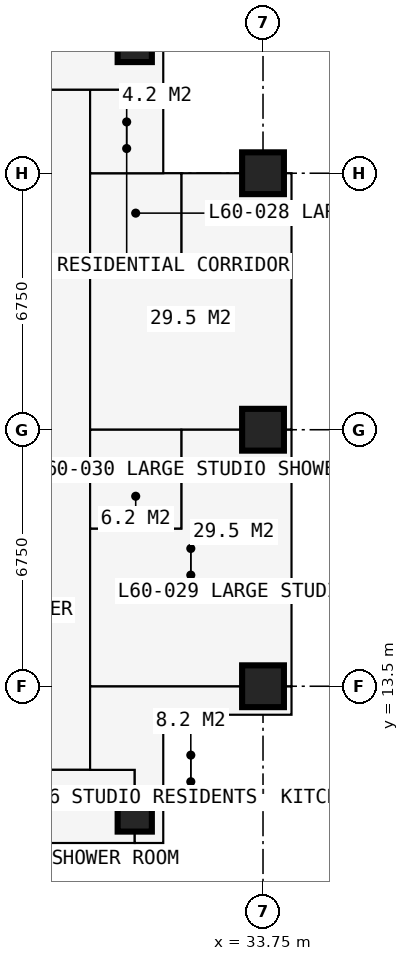
"""IFC4 building model, lengths in metres.
Left out: names, types, materials, properties, quantities, classifications, styles, units other than length and angle.
Written with IfcOpenShell. Run it as: python <this file> out.ifc"""

import sys

from ifc_helpers import new_model, si_unit, direction, frame, frame_2d, origin, origin_2d, place, context, subcontext, project, spatial, rectangle, extrude, element, fill, save


model = new_model("IFC4")
c1 = context("Model", 3, precision=1e-05, world=origin(), true_north=direction((0.0, 1.0)))
c2 = subcontext(c1, "Body", "Model", "MODEL_VIEW")
j1 = project(units=[si_unit("LENGTHUNIT", "METRE"), si_unit("PLANEANGLEUNIT", "RADIAN")], contexts=[c1])
p1 = place(None, origin())
s1 = spatial("IfcSite", under=j1, at=p1, CompositionType="ELEMENT")
p2 = place(p1, origin())
s2 = spatial("IfcBuilding", under=s1, at=p2, CompositionType="ELEMENT")
p3 = place(p2, frame((0.0, 0.0, 222.3)))
s3 = spatial("IfcBuildingStorey", under=s2, at=p3, CompositionType="ELEMENT", Elevation=222.3)
for number, where, z_axis, x_axis in (
    (1, (30.375, 10.125, 0.0), (0.0, 0.0, 1.0), (1.0, 0.0, 0.0)),
    (2, (30.375, 30.375, 0.0), (0.0, 0.0, 1.0), (1.0, 0.0, 0.0)),
):
    element("IfcColumn", number, at=place(p3, frame(where, z_axis=z_axis, x_axis=x_axis)), inside=s3, PredefinedType="COLUMN", context=c2, shape_type="SweptSolid", body=[
        extrude(rectangle(XDim=0.9, YDim=0.9, at=origin_2d()), origin(), (0.0, 0.0, 1.0), 3.6),
    ])
for number, where, z_axis, x_axis in (
    (3, (33.75, 13.5, 0.0), (0.0, 0.0, 1.0), (1.0, 0.0, 0.0)),
    (4, (33.75, 20.25, 0.0), (0.0, 0.0, 1.0), (1.0, 0.0, 0.0)),
    (5, (33.75, 27.0, 0.0), (0.0, 0.0, 1.0), (1.0, 0.0, 0.0)),
):
    element("IfcColumn", number, at=place(p3, frame(where, z_axis=z_axis, x_axis=x_axis)), inside=s3, PredefinedType="COLUMN", context=c2, shape_type="SweptSolid", body=[
        extrude(rectangle(XDim=1.1, YDim=1.1, at=origin_2d()), origin(), (0.0, 0.0, 1.0), 3.6),
    ])
p4 = place(p3, frame((34.5, 27.75, 0.0), z_axis=(0.0, 0.0, 1.0), x_axis=(-1.0, 0.0, 0.0)))
e6 = element("IfcWall", 6, at=p4, inside=s3, PredefinedType="SOLIDWALL", context=c2, shape_type="SweptSolid", body=[
    extrude(rectangle(XDim=3.375, YDim=0.3, at=frame_2d((1.688, 0.0))), origin(), (0.0, 0.0, 1.0), 3.375),
])
p5 = place(p4, frame((0.788, 0.0, 0.6)))
e7 = element("IfcOpeningElement", 7, at=p5, cuts=e6, PredefinedType="OPENING", context=c2, shape_type="SweptSolid", body=[
    extrude(rectangle(XDim=1.8, YDim=2.1, at=frame_2d((0.9, 1.05))), frame((0.0, 0.16, 0.0), z_axis=(0.0, -1.0, 0.0), x_axis=(1.0, 0.0, 0.0)), (0.0, 0.0, 1.0), 0.32),
])
p6 = place(p3, frame((31.125, 27.75, 0.0), z_axis=(0.0, 0.0, 1.0), x_axis=(0.0, 1.0, 0.0)))
e8 = element("IfcWall", 8, at=p6, inside=s3, PredefinedType="SOLIDWALL", context=c2, shape_type="SweptSolid", body=[
    extrude(rectangle(XDim=3.375, YDim=0.3, at=frame_2d((1.688, 0.0))), origin(), (0.0, 0.0, 1.0), 3.375),
])
p7 = place(p6, frame((1.663, 0.0, 0.9)))
e9 = element("IfcOpeningElement", 9, at=p7, cuts=e8, PredefinedType="OPENING", context=c2, shape_type="SweptSolid", body=[
    extrude(rectangle(XDim=1.5, YDim=1.8, at=frame_2d((0.75, 0.9))), frame((0.0, 0.16, 0.0), z_axis=(0.0, -1.0, 0.0), x_axis=(1.0, 0.0, 0.0)), (0.0, 0.0, 1.0), 0.32),
])
p8 = place(p3, frame((27.75, 9.375, 0.0), z_axis=(0.0, 0.0, 1.0), x_axis=(1.0, 0.0, 0.0)))
e10 = element("IfcWall", 10, at=p8, inside=s3, PredefinedType="SOLIDWALL", context=c2, shape_type="SweptSolid", body=[
    extrude(rectangle(XDim=3.375, YDim=0.3, at=frame_2d((1.688, 0.0))), origin(), (0.0, 0.0, 1.0), 3.375),
])
p9 = place(p8, frame((0.788, 0.0, 0.6)))
e11 = element("IfcOpeningElement", 11, at=p9, cuts=e10, PredefinedType="OPENING", context=c2, shape_type="SweptSolid", body=[
    extrude(rectangle(XDim=1.8, YDim=2.1, at=frame_2d((0.9, 1.05))), frame((0.0, 0.16, 0.0), z_axis=(0.0, -1.0, 0.0), x_axis=(1.0, 0.0, 0.0)), (0.0, 0.0, 1.0), 0.32),
])
p10 = place(p3, frame((31.125, 9.375, 0.0), z_axis=(0.0, 0.0, 1.0), x_axis=(0.0, 1.0, 0.0)))
e12 = element("IfcWall", 12, at=p10, inside=s3, PredefinedType="SOLIDWALL", context=c2, shape_type="SweptSolid", body=[
    extrude(rectangle(XDim=3.375, YDim=0.3, at=frame_2d((1.688, 0.0))), origin(), (0.0, 0.0, 1.0), 3.375),
])
p11 = place(p10, frame((0.788, 0.0, 0.6)))
e13 = element("IfcOpeningElement", 13, at=p11, cuts=e12, PredefinedType="OPENING", context=c2, shape_type="SweptSolid", body=[
    extrude(rectangle(XDim=1.8, YDim=2.1, at=frame_2d((0.9, 1.05))), frame((0.0, 0.16, 0.0), z_axis=(0.0, -1.0, 0.0), x_axis=(1.0, 0.0, 0.0)), (0.0, 0.0, 1.0), 0.32),
])
p12 = place(p3, frame((31.125, 12.75, 0.0), z_axis=(0.0, 0.0, 1.0), x_axis=(1.0, 0.0, 0.0)))
e14 = element("IfcWall", 14, at=p12, inside=s3, PredefinedType="SOLIDWALL", context=c2, shape_type="SweptSolid", body=[
    extrude(rectangle(XDim=3.375, YDim=0.3, at=frame_2d((1.688, 0.0))), origin(), (0.0, 0.0, 1.0), 3.375),
])
p13 = place(p12, frame((0.788, 0.0, 0.6)))
e15 = element("IfcOpeningElement", 15, at=p13, cuts=e14, PredefinedType="OPENING", context=c2, shape_type="SweptSolid", body=[
    extrude(rectangle(XDim=1.8, YDim=2.1, at=frame_2d((0.9, 1.05))), frame((0.0, 0.16, 0.0), z_axis=(0.0, -1.0, 0.0), x_axis=(1.0, 0.0, 0.0)), (0.0, 0.0, 1.0), 0.32),
])
p14 = place(p3, frame((11.3, 29.2, 0.0), z_axis=(0.0, 0.0, 1.0), x_axis=(1.0, 0.0, 0.0)))
e16 = element("IfcWall", 16, at=p14, inside=s3, PredefinedType="PARTITIONING", context=c2, shape_type="SweptSolid", body=[
    extrude(rectangle(XDim=19.809, YDim=0.15, at=frame_2d((9.904, 0.0))), origin(), (0.0, 0.0, 1.0), 3.375),
])
p15 = place(p14, frame((16.3, 0.0, 0.0)))
e17 = element("IfcOpeningElement", 17, at=p15, cuts=e16, PredefinedType="OPENING", context=c2, shape_type="SweptSolid", body=[
    extrude(rectangle(XDim=1.0, YDim=2.2, at=frame_2d((0.5, 1.1))), frame((0.0, 0.085, 0.0), z_axis=(0.0, -1.0, 0.0), x_axis=(1.0, 0.0, 0.0)), (0.0, 0.0, 1.0), 0.17),
])
p16 = place(p14, frame((5.825, 0.0, 0.0)))
e18 = element("IfcOpeningElement", 18, at=p16, cuts=e16, PredefinedType="OPENING", context=c2, shape_type="SweptSolid", body=[
    extrude(rectangle(XDim=0.95, YDim=2.2, at=frame_2d((0.475, 1.1))), frame((0.0, 0.085, 0.0), z_axis=(0.0, -1.0, 0.0), x_axis=(1.0, 0.0, 0.0)), (0.0, 0.0, 1.0), 0.17),
])
p17 = place(p14, frame((9.2, 0.0, 0.0)))
e19 = element("IfcOpeningElement", 19, at=p17, cuts=e16, PredefinedType="OPENING", context=c2, shape_type="SweptSolid", body=[
    extrude(rectangle(XDim=0.95, YDim=2.2, at=frame_2d((0.475, 1.1))), frame((0.0, 0.085, 0.0), z_axis=(0.0, -1.0, 0.0), x_axis=(1.0, 0.0, 0.0)), (0.0, 0.0, 1.0), 0.17),
])
p18 = place(p14, frame((12.575, 0.0, 0.0)))
e20 = element("IfcOpeningElement", 20, at=p18, cuts=e16, PredefinedType="OPENING", context=c2, shape_type="SweptSolid", body=[
    extrude(rectangle(XDim=0.95, YDim=2.2, at=frame_2d((0.475, 1.1))), frame((0.0, 0.085, 0.0), z_axis=(0.0, -1.0, 0.0), x_axis=(1.0, 0.0, 0.0)), (0.0, 0.0, 1.0), 0.17),
])
p19 = place(p14, frame((0.6, 0.0, 0.0)))
e21 = element("IfcOpeningElement", 21, at=p19, cuts=e16, PredefinedType="OPENING", context=c2, shape_type="SweptSolid", body=[
    extrude(rectangle(XDim=1.0, YDim=2.2, at=frame_2d((0.5, 1.1))), frame((0.0, 0.085, 0.0), z_axis=(0.0, -1.0, 0.0), x_axis=(1.0, 0.0, 0.0)), (0.0, 0.0, 1.0), 0.17),
])
p20 = place(p3, frame((27.0, 11.3, 0.0), z_axis=(0.0, 0.0, 1.0), x_axis=(1.0, 0.0, 0.0)))
e22 = element("IfcWall", 22, at=p20, inside=s3, PredefinedType="PARTITIONING", context=c2, shape_type="SweptSolid", body=[
    extrude(rectangle(XDim=3.375, YDim=0.15, at=frame_2d((1.688, 0.0))), origin(), (0.0, 0.0, 1.0), 3.375),
])
p21 = place(p20, frame((0.6, 0.0, 0.0)))
e23 = element("IfcOpeningElement", 23, at=p21, cuts=e22, PredefinedType="OPENING", context=c2, shape_type="SweptSolid", body=[
    extrude(rectangle(XDim=1.0, YDim=2.2, at=frame_2d((0.5, 1.1))), frame((0.0, 0.085, 0.0), z_axis=(0.0, -1.0, 0.0), x_axis=(1.0, 0.0, 0.0)), (0.0, 0.0, 1.0), 0.17),
])
p22 = place(p3, frame((29.2, 11.3, 0.0), z_axis=(0.0, 0.0, 1.0), x_axis=(0.0, 1.0, 0.0)))
e24 = element("IfcWall", 24, at=p22, inside=s3, PredefinedType="PARTITIONING", context=c2, shape_type="SweptSolid", body=[
    extrude(rectangle(XDim=17.9, YDim=0.2, at=frame_2d((8.95, 0.0))), origin(), (0.0, 0.0, 1.0), 3.375),
])
p23 = place(p22, frame((0.6, 0.0, 0.0)))
e25 = element("IfcOpeningElement", 25, at=p23, cuts=e24, PredefinedType="OPENING", context=c2, shape_type="SweptSolid", body=[
    extrude(rectangle(XDim=1.0, YDim=2.2, at=frame_2d((0.5, 1.1))), frame((0.0, 0.11, 0.0), z_axis=(0.0, -1.0, 0.0), x_axis=(1.0, 0.0, 0.0)), (0.0, 0.0, 1.0), 0.22),
])
p24 = place(p22, frame((10.55, 0.0, 0.0)))
e26 = element("IfcOpeningElement", 26, at=p24, cuts=e24, PredefinedType="OPENING", context=c2, shape_type="SweptSolid", body=[
    extrude(rectangle(XDim=0.95, YDim=2.2, at=frame_2d((0.475, 1.1))), frame((0.0, 0.11, 0.0), z_axis=(0.0, -1.0, 0.0), x_axis=(1.0, 0.0, 0.0)), (0.0, 0.0, 1.0), 0.22),
])
p25 = place(p22, frame((3.8, 0.0, 0.0)))
e27 = element("IfcOpeningElement", 27, at=p25, cuts=e24, PredefinedType="OPENING", context=c2, shape_type="SweptSolid", body=[
    extrude(rectangle(XDim=0.95, YDim=2.2, at=frame_2d((0.475, 1.1))), frame((0.0, 0.11, 0.0), z_axis=(0.0, -1.0, 0.0), x_axis=(1.0, 0.0, 0.0)), (0.0, 0.0, 1.0), 0.22),
])
p26 = place(p22, frame((16.3, 0.0, 0.0)))
e28 = element("IfcOpeningElement", 28, at=p26, cuts=e24, PredefinedType="OPENING", context=c2, shape_type="SweptSolid", body=[
    extrude(rectangle(XDim=1.0, YDim=2.2, at=frame_2d((0.5, 1.1))), frame((0.0, 0.11, 0.0), z_axis=(0.0, -1.0, 0.0), x_axis=(1.0, 0.0, 0.0)), (0.0, 0.0, 1.0), 0.22),
])
p27 = place(p3, frame((29.2, 13.5, 0.0), z_axis=(0.0, 0.0, 1.0), x_axis=(1.0, 0.0, 0.0)))
e29 = element("IfcWall", 29, at=p27, inside=s3, PredefinedType="PARTITIONING", context=c2, shape_type="SweptSolid", body=[
    extrude(rectangle(XDim=5.284, YDim=0.15, at=frame_2d((2.642, 0.0))), origin(), (0.0, 0.0, 1.0), 2.877),
])
p28 = place(p3, frame((29.2, 17.65, 0.0), z_axis=(0.0, 0.0, 1.0), x_axis=(1.0, 0.0, 0.0)))
e30 = element("IfcWall", 30, at=p28, inside=s3, PredefinedType="PARTITIONING", context=c2, shape_type="SweptSolid", body=[
    extrude(rectangle(XDim=2.4, YDim=0.1, at=frame_2d((1.2, 0.0))), origin(), (0.0, 0.0, 1.0), 3.375),
])
p29 = place(p3, frame((29.2, 20.25, 0.0), z_axis=(0.0, 0.0, 1.0), x_axis=(1.0, 0.0, 0.0)))
e31 = element("IfcWall", 31, at=p29, inside=s3, PredefinedType="PARTITIONING", context=c2, shape_type="SweptSolid", body=[
    extrude(rectangle(XDim=5.284, YDim=0.175, at=frame_2d((2.642, 0.0))), origin(), (0.0, 0.0, 1.0), 2.877),
])
p30 = place(p29, frame((0.75, 0.0, 0.0)))
e32 = element("IfcOpeningElement", 32, at=p30, cuts=e31, PredefinedType="OPENING", context=c2, shape_type="SweptSolid", body=[
    extrude(rectangle(XDim=0.9, YDim=2.2, at=frame_2d((0.45, 1.1))), frame((0.0, 0.097, 0.0), z_axis=(0.0, -1.0, 0.0), x_axis=(1.0, 0.0, 0.0)), (0.0, 0.0, 1.0), 0.195),
])
p31 = place(p3, frame((29.2, 24.4, 0.0), z_axis=(0.0, 0.0, 1.0), x_axis=(1.0, 0.0, 0.0)))
e33 = element("IfcWall", 33, at=p31, inside=s3, PredefinedType="PARTITIONING", context=c2, shape_type="SweptSolid", body=[
    extrude(rectangle(XDim=2.4, YDim=0.1, at=frame_2d((1.2, 0.0))), origin(), (0.0, 0.0, 1.0), 3.375),
])
p32 = place(p3, frame((29.2, 27.0, 0.0), z_axis=(0.0, 0.0, 1.0), x_axis=(1.0, 0.0, 0.0)))
e34 = element("IfcWall", 34, at=p32, inside=s3, PredefinedType="PARTITIONING", context=c2, shape_type="SweptSolid", body=[
    extrude(rectangle(XDim=5.284, YDim=0.175, at=frame_2d((2.642, 0.0))), origin(), (0.0, 0.0, 1.0), 2.877),
])
p33 = place(p3, frame((30.375, 9.525, 0.0), z_axis=(0.0, 0.0, 1.0), x_axis=(0.0, 1.0, 0.0)))
e35 = element("IfcWall", 35, at=p33, inside=s3, PredefinedType="PARTITIONING", context=c2, shape_type="SweptSolid", body=[
    extrude(rectangle(XDim=1.775, YDim=0.15, at=frame_2d((0.888, 0.0))), origin(), (0.0, 0.0, 1.0), 2.877),
])
p34 = place(p3, frame((31.125, 27.0, 0.0), z_axis=(0.0, 0.0, 1.0), x_axis=(0.0, 1.0, 0.0)))
e36 = element("IfcWall", 36, at=p34, inside=s3, PredefinedType="PARTITIONING", context=c2, shape_type="SweptSolid", body=[
    extrude(rectangle(XDim=0.734, YDim=0.15, at=frame_2d((0.367, 0.0))), origin(), (0.0, 0.0, 1.0), 3.375),
])
p35 = place(p3, frame((31.6, 17.65, 0.0), z_axis=(0.0, 0.0, 1.0), x_axis=(0.0, 1.0, 0.0)))
e37 = element("IfcWall", 37, at=p35, inside=s3, PredefinedType="PARTITIONING", context=c2, shape_type="SweptSolid", body=[
    extrude(rectangle(XDim=2.6, YDim=0.1, at=frame_2d((1.3, 0.0))), origin(), (0.0, 0.0, 1.0), 3.375),
])
p36 = place(p3, frame((31.6, 24.4, 0.0), z_axis=(0.0, 0.0, 1.0), x_axis=(0.0, 1.0, 0.0)))
e38 = element("IfcWall", 38, at=p36, inside=s3, PredefinedType="PARTITIONING", context=c2, shape_type="SweptSolid", body=[
    extrude(rectangle(XDim=2.6, YDim=0.1, at=frame_2d((1.3, 0.0))), origin(), (0.0, 0.0, 1.0), 3.375),
])
p37 = place(p36, frame((0.85, 0.0, 0.0)))
e39 = element("IfcOpeningElement", 39, at=p37, cuts=e38, PredefinedType="OPENING", context=c2, shape_type="SweptSolid", body=[
    extrude(rectangle(XDim=0.9, YDim=2.2, at=frame_2d((0.45, 1.1))), frame((0.0, 0.06, 0.0), z_axis=(0.0, -1.0, 0.0), x_axis=(1.0, 0.0, 0.0)), (0.0, 0.0, 1.0), 0.12),
])
p38 = place(p5, origin())
e40 = element("IfcWindow", 40, at=p38, inside=s3, PartitioningType="SINGLE_PANEL", PredefinedType="WINDOW", context=c2, shape_type="SweptSolid", body=[
    extrude(rectangle(XDim=1.8, YDim=2.1, at=frame_2d((0.9, 1.05))), frame((0.0, 0.03, 0.0), z_axis=(0.0, -1.0, 0.0), x_axis=(1.0, 0.0, 0.0)), (0.0, 0.0, 1.0), 0.06),
])
fill(e7, e40)
p39 = place(p7, origin())
e41 = element("IfcWindow", 41, at=p39, inside=s3, PartitioningType="SINGLE_PANEL", PredefinedType="WINDOW", context=c2, shape_type="SweptSolid", body=[
    extrude(rectangle(XDim=1.5, YDim=1.8, at=frame_2d((0.75, 0.9))), frame((0.0, 0.03, 0.0), z_axis=(0.0, -1.0, 0.0), x_axis=(1.0, 0.0, 0.0)), (0.0, 0.0, 1.0), 0.06),
])
fill(e9, e41)
p40 = place(p9, origin())
e42 = element("IfcWindow", 42, at=p40, inside=s3, PartitioningType="SINGLE_PANEL", PredefinedType="WINDOW", context=c2, shape_type="SweptSolid", body=[
    extrude(rectangle(XDim=1.8, YDim=2.1, at=frame_2d((0.9, 1.05))), frame((0.0, 0.03, 0.0), z_axis=(0.0, -1.0, 0.0), x_axis=(1.0, 0.0, 0.0)), (0.0, 0.0, 1.0), 0.06),
])
fill(e11, e42)
p41 = place(p11, origin())
e43 = element("IfcWindow", 43, at=p41, inside=s3, PartitioningType="SINGLE_PANEL", PredefinedType="WINDOW", context=c2, shape_type="SweptSolid", body=[
    extrude(rectangle(XDim=1.8, YDim=2.1, at=frame_2d((0.9, 1.05))), frame((0.0, 0.03, 0.0), z_axis=(0.0, -1.0, 0.0), x_axis=(1.0, 0.0, 0.0)), (0.0, 0.0, 1.0), 0.06),
])
fill(e13, e43)
p42 = place(p13, origin())
e44 = element("IfcWindow", 44, at=p42, inside=s3, PartitioningType="SINGLE_PANEL", PredefinedType="WINDOW", context=c2, shape_type="SweptSolid", body=[
    extrude(rectangle(XDim=1.8, YDim=2.1, at=frame_2d((0.9, 1.05))), frame((0.0, 0.03, 0.0), z_axis=(0.0, -1.0, 0.0), x_axis=(1.0, 0.0, 0.0)), (0.0, 0.0, 1.0), 0.06),
])
fill(e15, e44)
p43 = place(p21, origin())
e45 = element("IfcDoor", 45, at=p43, inside=s3, OperationType="SINGLE_SWING_LEFT", PredefinedType="DOOR", context=c2, shape_type="SweptSolid", body=[
    extrude(rectangle(XDim=1.0, YDim=2.2, at=frame_2d((0.5, 1.1))), frame((0.0, 0.025, 0.0), z_axis=(0.0, -1.0, 0.0), x_axis=(1.0, 0.0, 0.0)), (0.0, 0.0, 1.0), 0.05),
])
fill(e23, e45)
p44 = place(p23, origin())
e46 = element("IfcDoor", 46, at=p44, inside=s3, OperationType="SINGLE_SWING_LEFT", PredefinedType="DOOR", context=c2, shape_type="SweptSolid", body=[
    extrude(rectangle(XDim=1.0, YDim=2.2, at=frame_2d((0.5, 1.1))), frame((0.0, 0.025, 0.0), z_axis=(0.0, -1.0, 0.0), x_axis=(1.0, 0.0, 0.0)), (0.0, 0.0, 1.0), 0.05),
])
fill(e25, e46)
p45 = place(p24, origin())
e47 = element("IfcDoor", 47, at=p45, inside=s3, OperationType="SINGLE_SWING_LEFT", PredefinedType="DOOR", context=c2, shape_type="SweptSolid", body=[
    extrude(rectangle(XDim=0.95, YDim=2.2, at=frame_2d((0.475, 1.1))), frame((0.0, 0.025, 0.0), z_axis=(0.0, -1.0, 0.0), x_axis=(1.0, 0.0, 0.0)), (0.0, 0.0, 1.0), 0.05),
])
fill(e26, e47)
p46 = place(p37, origin())
e48 = element("IfcDoor", 48, at=p46, inside=s3, OperationType="SINGLE_SWING_RIGHT", PredefinedType="DOOR", context=c2, shape_type="SweptSolid", body=[
    extrude(rectangle(XDim=0.9, YDim=2.2, at=frame_2d((0.45, 1.1))), frame((0.0, 0.025, 0.0), z_axis=(0.0, -1.0, 0.0), x_axis=(1.0, 0.0, 0.0)), (0.0, 0.0, 1.0), 0.05),
])
fill(e39, e48)
p47 = place(p25, origin())
e49 = element("IfcDoor", 49, at=p47, inside=s3, OperationType="SINGLE_SWING_LEFT", PredefinedType="DOOR", context=c2, shape_type="SweptSolid", body=[
    extrude(rectangle(XDim=0.95, YDim=2.2, at=frame_2d((0.475, 1.1))), frame((0.0, 0.025, 0.0), z_axis=(0.0, -1.0, 0.0), x_axis=(1.0, 0.0, 0.0)), (0.0, 0.0, 1.0), 0.05),
])
fill(e27, e49)
p48 = place(p30, origin())
e50 = element("IfcDoor", 50, at=p48, inside=s3, OperationType="SINGLE_SWING_RIGHT", PredefinedType="DOOR", context=c2, shape_type="SweptSolid", body=[
    extrude(rectangle(XDim=0.9, YDim=2.2, at=frame_2d((0.45, 1.1))), frame((0.0, 0.025, 0.0), z_axis=(0.0, -1.0, 0.0), x_axis=(1.0, 0.0, 0.0)), (0.0, 0.0, 1.0), 0.05),
])
fill(e32, e50)
p49 = place(p26, origin())
e51 = element("IfcDoor", 51, at=p49, inside=s3, OperationType="SINGLE_SWING_LEFT", PredefinedType="DOOR", context=c2, shape_type="SweptSolid", body=[
    extrude(rectangle(XDim=1.0, YDim=2.2, at=frame_2d((0.5, 1.1))), frame((0.0, 0.025, 0.0), z_axis=(0.0, -1.0, 0.0), x_axis=(1.0, 0.0, 0.0)), (0.0, 0.0, 1.0), 0.05),
])
fill(e28, e51)
p50 = place(p15, origin())
e52 = element("IfcDoor", 52, at=p50, inside=s3, OperationType="SINGLE_SWING_LEFT", PredefinedType="DOOR", context=c2, shape_type="SweptSolid", body=[
    extrude(rectangle(XDim=1.0, YDim=2.2, at=frame_2d((0.5, 1.1))), frame((0.0, 0.025, 0.0), z_axis=(0.0, -1.0, 0.0), x_axis=(1.0, 0.0, 0.0)), (0.0, 0.0, 1.0), 0.05),
])
fill(e17, e52)
save(model, sys.argv[1])
